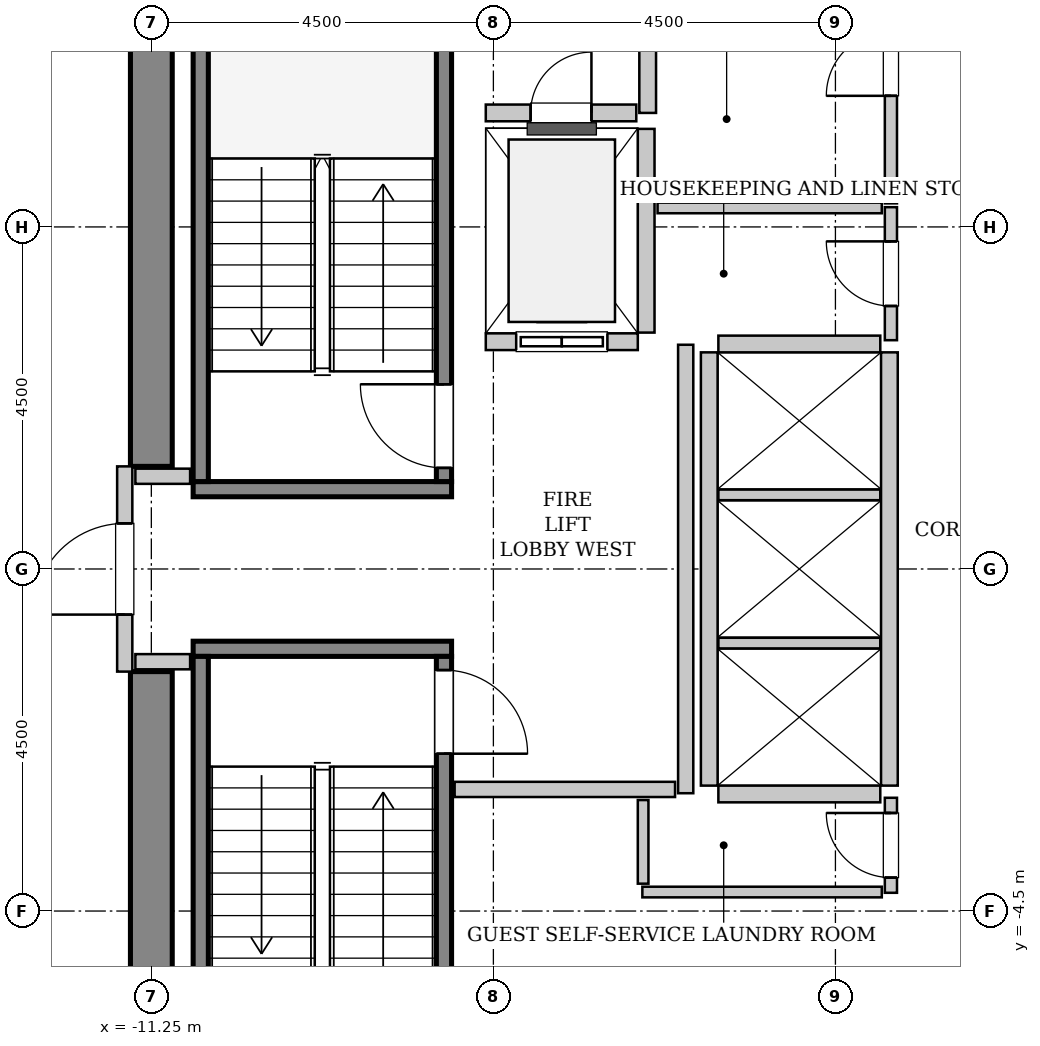
"""IFC4 building model, lengths in metres.
Left out: names, types, materials, properties, quantities, classifications, styles, units other than length and angle.
Written with IfcOpenShell. Run it as: python <this file> out.ifc"""

import sys

from ifc_helpers import new_model, si_unit, direction, frame, frame_2d, origin, place, context, subcontext, project, spatial, rectangle, extrude, source, transform, mapped, element, fill, save


model = new_model("IFC4")
c1 = context("Model", 3, precision=1e-05, world=origin(), true_north=direction((0.0, 1.0)))
c2 = subcontext(c1, "Body", "Model", "MODEL_VIEW")
j1 = project(units=[si_unit("LENGTHUNIT", "METRE"), si_unit("PLANEANGLEUNIT", "RADIAN")], contexts=[c1])
p1 = place(None, origin())
s1 = spatial("IfcSite", under=j1, at=p1, CompositionType="ELEMENT")
p2 = place(p1, origin())
s2 = spatial("IfcBuilding", under=s1, at=p2, CompositionType="ELEMENT")
p3 = place(p2, frame((0.0, 0.0, 186.8)))
s3 = spatial("IfcBuildingStorey", under=s2, at=p3, CompositionType="ELEMENT", Elevation=186.8)
m1 = source(origin(), c2, "Body", "SweptSolid", [
    extrude(rectangle(XDim=7.375, YDim=0.55, at=frame_2d((3.688, 0.0))), origin(), (0.0, 0.0, 1.0), 3.8),
])
for number, where, z_axis, x_axis in (
    (1, (-11.25, -8.725, 0.0), (0.0, 0.0, 1.0), (0.0, 1.0, 0.0)),
    (2, (-11.25, 1.35, 0.0), (0.0, 0.0, 1.0), (0.0, 1.0, 0.0)),
):
    element("IfcWall", number, at=place(p3, frame(where, z_axis=z_axis, x_axis=x_axis)), inside=s3, PredefinedType="SHEAR", context=c2, shape_type="MappedRepresentation", body=[
        mapped(m1, transform((0.0, 0.0, 0.0), x_axis=(1.0, 0.0, 0.0), y_axis=(0.0, 1.0, 0.0), z_axis=(0.0, 0.0, 1.0), scale=1.0)),
    ])
m2 = source(origin(), c2, "Body", "SweptSolid", [
    extrude(rectangle(XDim=3.4, YDim=0.2, at=frame_2d((1.7, 0.0))), origin(), (0.0, 0.0, 1.0), 3.8),
])
p4 = place(p3, frame((-7.3, 1.05, 0.0), z_axis=(0.0, 0.0, 1.0), x_axis=(-1.0, 0.0, 0.0)))
e3 = element("IfcWall", 3, at=p4, inside=s3, PredefinedType="SOLIDWALL", context=c2, shape_type="MappedRepresentation", body=[
    mapped(m2, transform((0.0, 0.0, 0.0), x_axis=(1.0, 0.0, 0.0), y_axis=(0.0, 1.0, 0.0), z_axis=(0.0, 0.0, 1.0), scale=1.0)),
])
m3 = source(origin(), c2, "Body", "SweptSolid", [
    extrude(rectangle(XDim=7.1, YDim=0.2, at=frame_2d((3.55, 0.0))), origin(), (0.0, 0.0, 1.0), 3.8),
])
p5 = place(p3, frame((-7.4, 1.15, 0.0), z_axis=(0.0, 0.0, 1.0), x_axis=(0.0, 1.0, 0.0)))
e4 = element("IfcWall", 4, at=p5, inside=s3, PredefinedType="SOLIDWALL", context=c2, shape_type="MappedRepresentation", body=[
    mapped(m3, transform((0.0, 0.0, 0.0), x_axis=(1.0, 0.0, 0.0), y_axis=(0.0, 1.0, 0.0), z_axis=(0.0, 0.0, 1.0), scale=1.0)),
])
p6 = place(p5, frame((0.18, 0.0, 0.0)))
e5 = element("IfcOpeningElement", 5, at=p6, cuts=e4, PredefinedType="OPENING", context=c2, shape_type="SweptSolid", body=[
    extrude(rectangle(XDim=1.1, YDim=2.15, at=frame_2d((0.55, 1.075))), frame((0.0, 0.11, 0.0), z_axis=(0.0, -1.0, 0.0), x_axis=(1.0, 0.0, 0.0)), (0.0, 0.0, 1.0), 0.22),
])
p7 = place(p3, frame((-10.6, 1.15, 0.0), z_axis=(0.0, 0.0, 1.0), x_axis=(0.0, 1.0, 0.0)))
e6 = element("IfcWall", 6, at=p7, inside=s3, PredefinedType="SOLIDWALL", context=c2, shape_type="MappedRepresentation", body=[
    mapped(m3, transform((0.0, 0.0, 0.0), x_axis=(1.0, 0.0, 0.0), y_axis=(0.0, 1.0, 0.0), z_axis=(0.0, 0.0, 1.0), scale=1.0)),
])
p8 = place(p3, frame((-10.7, -1.05, 0.0), z_axis=(0.0, 0.0, 1.0), x_axis=(1.0, 0.0, 0.0)))
e7 = element("IfcWall", 7, at=p8, inside=s3, PredefinedType="SOLIDWALL", context=c2, shape_type="MappedRepresentation", body=[
    mapped(m2, transform((0.0, 0.0, 0.0), x_axis=(1.0, 0.0, 0.0), y_axis=(0.0, 1.0, 0.0), z_axis=(0.0, 0.0, 1.0), scale=1.0)),
])
p9 = place(p3, frame((-10.6, -1.15, 0.0), z_axis=(0.0, 0.0, 1.0), x_axis=(0.0, -1.0, 0.0)))
e8 = element("IfcWall", 8, at=p9, inside=s3, PredefinedType="SOLIDWALL", context=c2, shape_type="MappedRepresentation", body=[
    mapped(m3, transform((0.0, 0.0, 0.0), x_axis=(1.0, 0.0, 0.0), y_axis=(0.0, 1.0, 0.0), z_axis=(0.0, 0.0, 1.0), scale=1.0)),
])
p10 = place(p3, frame((-7.4, -1.15, 0.0), z_axis=(0.0, 0.0, 1.0), x_axis=(0.0, -1.0, 0.0)))
e9 = element("IfcWall", 9, at=p10, inside=s3, PredefinedType="SOLIDWALL", context=c2, shape_type="MappedRepresentation", body=[
    mapped(m3, transform((0.0, 0.0, 0.0), x_axis=(1.0, 0.0, 0.0), y_axis=(0.0, 1.0, 0.0), z_axis=(0.0, 0.0, 1.0), scale=1.0)),
])
p11 = place(p10, frame((0.18, 0.0, 0.0)))
e10 = element("IfcOpeningElement", 10, at=p11, cuts=e9, PredefinedType="OPENING", context=c2, shape_type="SweptSolid", body=[
    extrude(rectangle(XDim=1.1, YDim=2.15, at=frame_2d((0.55, 1.075))), frame((0.0, 0.11, 0.0), z_axis=(0.0, -1.0, 0.0), x_axis=(1.0, 0.0, 0.0)), (0.0, 0.0, 1.0), 0.22),
])
m4 = source(origin(), c2, "Body", "SweptSolid", [
    extrude(rectangle(XDim=2.0, YDim=0.22, at=frame_2d((1.0, 0.0))), origin(), (0.0, 0.0, 1.0), 3.535),
])
p12 = place(p3, frame((-6.85, 2.99, 0.0), z_axis=(0.0, 0.0, 1.0), x_axis=(1.0, 0.0, 0.0)))
e11 = element("IfcWall", 11, at=p12, inside=s3, PredefinedType="SOLIDWALL", context=c2, shape_type="MappedRepresentation", body=[
    mapped(m4, transform((0.0, 0.0, 0.0), x_axis=(1.0, 0.0, 0.0), y_axis=(0.0, 1.0, 0.0), z_axis=(0.0, 0.0, 1.0), scale=1.0)),
])
p13 = place(p12, frame((0.4, 0.0, 0.0)))
e12 = element("IfcOpeningElement", 12, at=p13, cuts=e11, PredefinedType="OPENING", context=c2, shape_type="SweptSolid", body=[
    extrude(rectangle(XDim=1.2, YDim=2.2, at=frame_2d((0.6, 1.1))), frame((0.0, 0.12, 0.0), z_axis=(0.0, -1.0, 0.0), x_axis=(1.0, 0.0, 0.0)), (0.0, 0.0, 1.0), 0.24),
])
m5 = source(origin(), c2, "Body", "SweptSolid", [
    extrude(rectangle(XDim=2.68, YDim=0.22, at=frame_2d((1.34, 0.0))), origin(), (0.0, 0.0, 1.0), 3.535),
])
p14 = place(p3, frame((-4.74, 3.11, 0.0), z_axis=(0.0, 0.0, 1.0), x_axis=(0.0, 1.0, 0.0)))
e13 = element("IfcWall", 13, at=p14, inside=s3, PredefinedType="SOLIDWALL", context=c2, shape_type="MappedRepresentation", body=[
    mapped(m5, transform((0.0, 0.0, 0.0), x_axis=(1.0, 0.0, 0.0), y_axis=(0.0, 1.0, 0.0), z_axis=(0.0, 0.0, 1.0), scale=1.0)),
])
m6 = source(origin(), c2, "Body", "SweptSolid", [
    extrude(rectangle(XDim=5.7, YDim=0.22, at=frame_2d((2.85, 0.0))), origin(), (0.0, 0.0, 1.0), 3.535),
])
for number, where, z_axis, x_axis in (
    (14, (-1.54, -2.85, 0.0), (0.0, 0.0, 1.0), (0.0, 1.0, 0.0)),
    (15, (-3.91, 2.85, 0.0), (0.0, 0.0, 1.0), (0.0, -1.0, 0.0)),
):
    element("IfcWall", number, at=place(p3, frame(where, z_axis=z_axis, x_axis=x_axis)), inside=s3, PredefinedType="SOLIDWALL", context=c2, shape_type="MappedRepresentation", body=[
        mapped(m6, transform((0.0, 0.0, 0.0), x_axis=(1.0, 0.0, 0.0), y_axis=(0.0, 1.0, 0.0), z_axis=(0.0, 0.0, 1.0), scale=1.0)),
    ])
m7 = source(origin(), c2, "Body", "SweptSolid", [
    extrude(rectangle(XDim=2.13, YDim=0.22, at=frame_2d((1.065, 0.0))), origin(), (0.0, 0.0, 1.0), 3.535),
])
p15 = place(p3, frame((-3.79, -2.96, 0.0), z_axis=(0.0, 0.0, 1.0), x_axis=(1.0, 0.0, 0.0)))
e16 = element("IfcWall", 16, at=p15, inside=s3, PredefinedType="SOLIDWALL", context=c2, shape_type="MappedRepresentation", body=[
    mapped(m7, transform((0.0, 0.0, 0.0), x_axis=(1.0, 0.0, 0.0), y_axis=(0.0, 1.0, 0.0), z_axis=(0.0, 0.0, 1.0), scale=1.0)),
])
m8 = source(origin(), c2, "Body", "SweptSolid", [
    extrude(rectangle(XDim=2.13, YDim=0.14, at=frame_2d((1.065, 0.0))), origin(), (0.0, 0.0, 1.0), 3.535),
])
for number, where, z_axis, x_axis in (
    (17, (-3.79, -0.975, 0.0), (0.0, 0.0, 1.0), (1.0, 0.0, 0.0)),
    (18, (-3.79, 0.975, 0.0), (0.0, 0.0, 1.0), (1.0, 0.0, 0.0)),
):
    element("IfcWall", number, at=place(p3, frame(where, z_axis=z_axis, x_axis=x_axis)), inside=s3, PredefinedType="PARTITIONING", context=c2, shape_type="MappedRepresentation", body=[
        mapped(m8, transform((0.0, 0.0, 0.0), x_axis=(1.0, 0.0, 0.0), y_axis=(0.0, 1.0, 0.0), z_axis=(0.0, 0.0, 1.0), scale=1.0)),
    ])
p16 = place(p3, frame((-1.66, 2.96, 0.0), z_axis=(0.0, 0.0, 1.0), x_axis=(-1.0, 0.0, 0.0)))
e19 = element("IfcWall", 19, at=p16, inside=s3, PredefinedType="SOLIDWALL", context=c2, shape_type="MappedRepresentation", body=[
    mapped(m7, transform((0.0, 0.0, 0.0), x_axis=(1.0, 0.0, 0.0), y_axis=(0.0, 1.0, 0.0), z_axis=(0.0, 0.0, 1.0), scale=1.0)),
])
m9 = source(origin(), c2, "Body", "SweptSolid", [
    extrude(rectangle(XDim=2.25, YDim=0.22, at=frame_2d((1.125, 0.0))), origin(), (0.0, 0.0, 1.0), 3.535),
])
p17 = place(p3, frame((-4.72, 6.0, 0.0), z_axis=(0.0, 0.0, 1.0), x_axis=(0.0, 1.0, 0.0)))
e20 = element("IfcWall", 20, at=p17, inside=s3, PredefinedType="SOLIDWALL", context=c2, shape_type="MappedRepresentation", body=[
    mapped(m9, transform((0.0, 0.0, 0.0), x_axis=(1.0, 0.0, 0.0), y_axis=(0.0, 1.0, 0.0), z_axis=(0.0, 0.0, 1.0), scale=1.0)),
])
m10 = source(origin(), c2, "Body", "SweptSolid", [
    extrude(rectangle(XDim=1.98, YDim=0.22, at=frame_2d((0.99, 0.0))), origin(), (0.0, 0.0, 1.0), 3.535),
])
p18 = place(p3, frame((-6.85, 6.0, 0.0), z_axis=(0.0, 0.0, 1.0), x_axis=(1.0, 0.0, 0.0)))
e21 = element("IfcWall", 21, at=p18, inside=s3, PredefinedType="SOLIDWALL", context=c2, shape_type="MappedRepresentation", body=[
    mapped(m10, transform((0.0, 0.0, 0.0), x_axis=(1.0, 0.0, 0.0), y_axis=(0.0, 1.0, 0.0), z_axis=(0.0, 0.0, 1.0), scale=1.0)),
])
p19 = place(p18, frame((0.59, 0.0, 0.0)))
e22 = element("IfcOpeningElement", 22, at=p19, cuts=e21, PredefinedType="OPENING", context=c2, shape_type="SweptSolid", body=[
    extrude(rectangle(XDim=0.8, YDim=2.0, at=frame_2d((0.4, 1.0))), frame((0.0, 0.12, 0.0), z_axis=(0.0, -1.0, 0.0), x_axis=(1.0, 0.0, 0.0)), (0.0, 0.0, 1.0), 0.24),
])
m11 = source(origin(), c2, "Body", "SweptSolid", [
    extrude(rectangle(XDim=2.7, YDim=0.2, at=frame_2d((1.35, 0.0))), origin(), (0.0, 0.0, 1.0), 2.425),
])
p20 = place(p3, frame((-11.6, -1.35, 0.0), z_axis=(0.0, 0.0, 1.0), x_axis=(0.0, 1.0, 0.0)))
e23 = element("IfcWall", 23, at=p20, inside=s3, PredefinedType="PARTITIONING", context=c2, shape_type="MappedRepresentation", body=[
    mapped(m11, transform((0.0, 0.0, 0.0), x_axis=(1.0, 0.0, 0.0), y_axis=(0.0, 1.0, 0.0), z_axis=(0.0, 0.0, 1.0), scale=1.0)),
])
p21 = place(p20, frame((0.75, 0.0, 0.0)))
e24 = element("IfcOpeningElement", 24, at=p21, cuts=e23, PredefinedType="OPENING", context=c2, shape_type="SweptSolid", body=[
    extrude(rectangle(XDim=1.2, YDim=2.15, at=frame_2d((0.6, 1.075))), frame((0.0, 0.11, 0.0), z_axis=(0.0, -1.0, 0.0), x_axis=(1.0, 0.0, 0.0)), (0.0, 0.0, 1.0), 0.22),
])
m12 = source(origin(), c2, "Body", "SweptSolid", [
    extrude(rectangle(XDim=5.9, YDim=0.2, at=frame_2d((2.95, 0.0))), origin(), (0.0, 0.0, 1.0), 3.535),
])
p22 = place(p3, frame((-4.22, -2.95, 0.0), z_axis=(0.0, 0.0, 1.0), x_axis=(0.0, 1.0, 0.0)))
e25 = element("IfcWall", 25, at=p22, inside=s3, PredefinedType="PARTITIONING", context=c2, shape_type="MappedRepresentation", body=[
    mapped(m12, transform((0.0, 0.0, 0.0), x_axis=(1.0, 0.0, 0.0), y_axis=(0.0, 1.0, 0.0), z_axis=(0.0, 0.0, 1.0), scale=1.0)),
])
m13 = source(origin(), c2, "Body", "SweptSolid", [
    extrude(rectangle(XDim=2.9, YDim=0.2, at=frame_2d((1.45, 0.0))), origin(), (0.0, 0.0, 1.0), 3.535),
])
p23 = place(p3, frame((-7.26, -2.9, 0.0), z_axis=(0.0, 0.0, 1.0), x_axis=(1.0, 0.0, 0.0)))
e26 = element("IfcWall", 26, at=p23, inside=s3, PredefinedType="PARTITIONING", context=c2, shape_type="MappedRepresentation", body=[
    mapped(m13, transform((0.0, 0.0, 0.0), x_axis=(1.0, 0.0, 0.0), y_axis=(0.0, 1.0, 0.0), z_axis=(0.0, 0.0, 1.0), scale=1.0)),
])
m14 = source(origin(), c2, "Body", "SweptSolid", [
    extrude(rectangle(XDim=0.72, YDim=0.2, at=frame_2d((0.36, 0.0))), origin(), (0.0, 0.0, 1.0), 3.535),
])
for number, where, z_axis, x_axis in (
    (27, (-11.46, 1.22, 0.0), (0.0, 0.0, 1.0), (1.0, 0.0, 0.0)),
    (28, (-11.46, -1.22, 0.0), (0.0, 0.0, 1.0), (1.0, 0.0, 0.0)),
):
    element("IfcWall", number, at=place(p3, frame(where, z_axis=z_axis, x_axis=x_axis)), inside=s3, PredefinedType="PARTITIONING", context=c2, shape_type="MappedRepresentation", body=[
        mapped(m14, transform((0.0, 0.0, 0.0), x_axis=(1.0, 0.0, 0.0), y_axis=(0.0, 1.0, 0.0), z_axis=(0.0, 0.0, 1.0), scale=1.0)),
    ])
m15 = source(origin(), c2, "Body", "SweptSolid", [
    extrude(rectangle(XDim=1.75, YDim=0.16, at=frame_2d((0.875, 0.0))), origin(), (0.0, 0.0, 1.0), 3.535),
])
p24 = place(p3, frame((-1.52, 3.01, 0.0), z_axis=(0.0, 0.0, 1.0), x_axis=(0.0, 1.0, 0.0)))
e29 = element("IfcWall", 29, at=p24, inside=s3, PredefinedType="PARTITIONING", context=c2, shape_type="MappedRepresentation", body=[
    mapped(m15, transform((0.0, 0.0, 0.0), x_axis=(1.0, 0.0, 0.0), y_axis=(0.0, 1.0, 0.0), z_axis=(0.0, 0.0, 1.0), scale=1.0)),
])
p25 = place(p24, frame((0.45, 0.0, 0.0)))
e30 = element("IfcOpeningElement", 30, at=p25, cuts=e29, PredefinedType="OPENING", context=c2, shape_type="SweptSolid", body=[
    extrude(rectangle(XDim=0.85, YDim=2.1, at=frame_2d((0.425, 1.05))), frame((0.0, 0.09, 0.0), z_axis=(0.0, -1.0, 0.0), x_axis=(1.0, 0.0, 0.0)), (0.0, 0.0, 1.0), 0.18),
])
m16 = source(origin(), c2, "Body", "SweptSolid", [
    extrude(rectangle(XDim=2.95, YDim=0.14, at=frame_2d((1.475, 0.0))), origin(), (0.0, 0.0, 1.0), 3.535),
])
p26 = place(p3, frame((-4.59, 4.75, 0.0), z_axis=(0.0, 0.0, 1.0), x_axis=(1.0, 0.0, 0.0)))
e31 = element("IfcWall", 31, at=p26, inside=s3, PredefinedType="PARTITIONING", context=c2, shape_type="MappedRepresentation", body=[
    mapped(m16, transform((0.0, 0.0, 0.0), x_axis=(1.0, 0.0, 0.0), y_axis=(0.0, 1.0, 0.0), z_axis=(0.0, 0.0, 1.0), scale=1.0)),
])
m17 = source(origin(), c2, "Body", "SweptSolid", [
    extrude(rectangle(XDim=3.68, YDim=0.16, at=frame_2d((1.84, 0.0))), origin(), (0.0, 0.0, 1.0), 3.535),
])
p27 = place(p3, frame((-1.52, 4.81, 0.0), z_axis=(0.0, 0.0, 1.0), x_axis=(0.0, 1.0, 0.0)))
e32 = element("IfcWall", 32, at=p27, inside=s3, PredefinedType="PARTITIONING", context=c2, shape_type="MappedRepresentation", body=[
    mapped(m17, transform((0.0, 0.0, 0.0), x_axis=(1.0, 0.0, 0.0), y_axis=(0.0, 1.0, 0.0), z_axis=(0.0, 0.0, 1.0), scale=1.0)),
])
p28 = place(p27, frame((1.415, 0.0, 0.0)))
e33 = element("IfcOpeningElement", 33, at=p28, cuts=e32, PredefinedType="OPENING", context=c2, shape_type="SweptSolid", body=[
    extrude(rectangle(XDim=0.85, YDim=2.1, at=frame_2d((0.425, 1.05))), frame((0.0, 0.09, 0.0), z_axis=(0.0, -1.0, 0.0), x_axis=(1.0, 0.0, 0.0)), (0.0, 0.0, 1.0), 0.18),
])
m18 = source(origin(), c2, "Body", "SweptSolid", [
    extrude(rectangle(XDim=1.25, YDim=0.16, at=frame_2d((0.625, 0.0))), origin(), (0.0, 0.0, 1.0), 3.535),
])
p29 = place(p3, frame((-1.52, -4.26, 0.0), z_axis=(0.0, 0.0, 1.0), x_axis=(0.0, 1.0, 0.0)))
e34 = element("IfcWall", 34, at=p29, inside=s3, PredefinedType="PARTITIONING", context=c2, shape_type="MappedRepresentation", body=[
    mapped(m18, transform((0.0, 0.0, 0.0), x_axis=(1.0, 0.0, 0.0), y_axis=(0.0, 1.0, 0.0), z_axis=(0.0, 0.0, 1.0), scale=1.0)),
])
p30 = place(p29, frame((0.2, 0.0, 0.0)))
e35 = element("IfcOpeningElement", 35, at=p30, cuts=e34, PredefinedType="OPENING", context=c2, shape_type="SweptSolid", body=[
    extrude(rectangle(XDim=0.85, YDim=2.1, at=frame_2d((0.425, 1.05))), frame((0.0, 0.09, 0.0), z_axis=(0.0, -1.0, 0.0), x_axis=(1.0, 0.0, 0.0)), (0.0, 0.0, 1.0), 0.18),
])
m19 = source(origin(), c2, "Body", "SweptSolid", [
    extrude(rectangle(XDim=3.15, YDim=0.14, at=frame_2d((1.575, 0.0))), origin(), (0.0, 0.0, 1.0), 3.535),
])
p31 = place(p3, frame((-4.79, -4.25, 0.0), z_axis=(0.0, 0.0, 1.0), x_axis=(1.0, 0.0, 0.0)))
e36 = element("IfcWall", 36, at=p31, inside=s3, PredefinedType="PARTITIONING", context=c2, shape_type="MappedRepresentation", body=[
    mapped(m19, transform((0.0, 0.0, 0.0), x_axis=(1.0, 0.0, 0.0), y_axis=(0.0, 1.0, 0.0), z_axis=(0.0, 0.0, 1.0), scale=1.0)),
])
m20 = source(origin(), c2, "Body", "SweptSolid", [
    extrude(rectangle(XDim=1.1, YDim=0.14, at=frame_2d((0.55, 0.0))), origin(), (0.0, 0.0, 1.0), 3.535),
])
p32 = place(p3, frame((-4.78, -4.14, 0.0), z_axis=(0.0, 0.0, 1.0), x_axis=(0.0, 1.0, 0.0)))
e37 = element("IfcWall", 37, at=p32, inside=s3, PredefinedType="PARTITIONING", context=c2, shape_type="MappedRepresentation", body=[
    mapped(m20, transform((0.0, 0.0, 0.0), x_axis=(1.0, 0.0, 0.0), y_axis=(0.0, 1.0, 0.0), z_axis=(0.0, 0.0, 1.0), scale=1.0)),
])
m21 = source(origin(), c2, "Body", "SweptSolid", [
    extrude(rectangle(XDim=1.1, YDim=2.15, at=frame_2d((0.55, 1.075))), frame((0.0, 0.025, 0.0), z_axis=(0.0, -1.0, 0.0), x_axis=(1.0, 0.0, 0.0)), (0.0, 0.0, 1.0), 0.05),
])
p33 = place(p6, origin())
e38 = element("IfcDoor", 38, at=p33, inside=s3, OperationType="SINGLE_SWING_RIGHT", PredefinedType="DOOR", context=c2, shape_type="MappedRepresentation", body=[
    mapped(m21, transform((0.0, 0.0, 0.0), x_axis=(1.0, 0.0, 0.0), y_axis=(0.0, 1.0, 0.0), z_axis=(0.0, 0.0, 1.0), scale=1.0)),
])
fill(e5, e38)
p34 = place(p11, origin())
e39 = element("IfcDoor", 39, at=p34, inside=s3, OperationType="SINGLE_SWING_RIGHT", PredefinedType="DOOR", context=c2, shape_type="MappedRepresentation", body=[
    mapped(m21, transform((0.0, 0.0, 0.0), x_axis=(1.0, 0.0, 0.0), y_axis=(0.0, 1.0, 0.0), z_axis=(0.0, 0.0, 1.0), scale=1.0)),
])
fill(e10, e39)
m22 = source(origin(), c2, "Body", "SweptSolid", [
    extrude(rectangle(XDim=1.2, YDim=2.2, at=frame_2d((0.6, 1.1))), frame((0.0, 0.025, 0.0), z_axis=(0.0, -1.0, 0.0), x_axis=(1.0, 0.0, 0.0)), (0.0, 0.0, 1.0), 0.05),
])
p35 = place(p13, origin())
e40 = element("IfcDoor", 40, at=p35, inside=s3, OperationType="SLIDING_TO_LEFT", PredefinedType="DOOR", context=c2, shape_type="MappedRepresentation", body=[
    mapped(m22, transform((0.0, 0.0, 0.0), x_axis=(1.0, 0.0, 0.0), y_axis=(0.0, 1.0, 0.0), z_axis=(0.0, 0.0, 1.0), scale=1.0)),
])
fill(e12, e40)
m23 = source(origin(), c2, "Body", "SweptSolid", [
    extrude(rectangle(XDim=0.8, YDim=2.0, at=frame_2d((0.4, 1.0))), frame((0.0, 0.025, 0.0), z_axis=(0.0, -1.0, 0.0), x_axis=(1.0, 0.0, 0.0)), (0.0, 0.0, 1.0), 0.05),
])
p36 = place(p19, origin())
e41 = element("IfcDoor", 41, at=p36, inside=s3, OperationType="SINGLE_SWING_RIGHT", PredefinedType="TRAPDOOR", context=c2, shape_type="MappedRepresentation", body=[
    mapped(m23, transform((0.0, 0.0, 0.0), x_axis=(1.0, 0.0, 0.0), y_axis=(0.0, 1.0, 0.0), z_axis=(0.0, 0.0, 1.0), scale=1.0)),
])
fill(e22, e41)
m24 = source(origin(), c2, "Body", "SweptSolid", [
    extrude(rectangle(XDim=1.2, YDim=2.15, at=frame_2d((0.6, 1.075))), frame((0.0, 0.025, 0.0), z_axis=(0.0, -1.0, 0.0), x_axis=(1.0, 0.0, 0.0)), (0.0, 0.0, 1.0), 0.05),
])
p37 = place(p21, origin())
e42 = element("IfcDoor", 42, at=p37, inside=s3, OperationType="SINGLE_SWING_LEFT", PredefinedType="DOOR", context=c2, shape_type="MappedRepresentation", body=[
    mapped(m24, transform((0.0, 0.0, 0.0), x_axis=(1.0, 0.0, 0.0), y_axis=(0.0, 1.0, 0.0), z_axis=(0.0, 0.0, 1.0), scale=1.0)),
])
fill(e24, e42)
m25 = source(origin(), c2, "Body", "SweptSolid", [
    extrude(rectangle(XDim=0.85, YDim=2.1, at=frame_2d((0.425, 1.05))), frame((0.0, 0.025, 0.0), z_axis=(0.0, -1.0, 0.0), x_axis=(1.0, 0.0, 0.0)), (0.0, 0.0, 1.0), 0.05),
])
p38 = place(p25, origin())
e43 = element("IfcDoor", 43, at=p38, inside=s3, OperationType="SINGLE_SWING_RIGHT", PredefinedType="DOOR", context=c2, shape_type="MappedRepresentation", body=[
    mapped(m25, transform((0.0, 0.0, 0.0), x_axis=(1.0, 0.0, 0.0), y_axis=(0.0, 1.0, 0.0), z_axis=(0.0, 0.0, 1.0), scale=1.0)),
])
fill(e30, e43)
p39 = place(p28, origin())
e44 = element("IfcDoor", 44, at=p39, inside=s3, OperationType="SINGLE_SWING_LEFT", PredefinedType="DOOR", context=c2, shape_type="MappedRepresentation", body=[
    mapped(m25, transform((0.0, 0.0, 0.0), x_axis=(1.0, 0.0, 0.0), y_axis=(0.0, 1.0, 0.0), z_axis=(0.0, 0.0, 1.0), scale=1.0)),
])
fill(e33, e44)
p40 = place(p30, origin())
e45 = element("IfcDoor", 45, at=p40, inside=s3, OperationType="SINGLE_SWING_RIGHT", PredefinedType="DOOR", context=c2, shape_type="MappedRepresentation", body=[
    mapped(m25, transform((0.0, 0.0, 0.0), x_axis=(1.0, 0.0, 0.0), y_axis=(0.0, 1.0, 0.0), z_axis=(0.0, 0.0, 1.0), scale=1.0)),
])
fill(e35, e45)
save(model, sys.argv[1])
